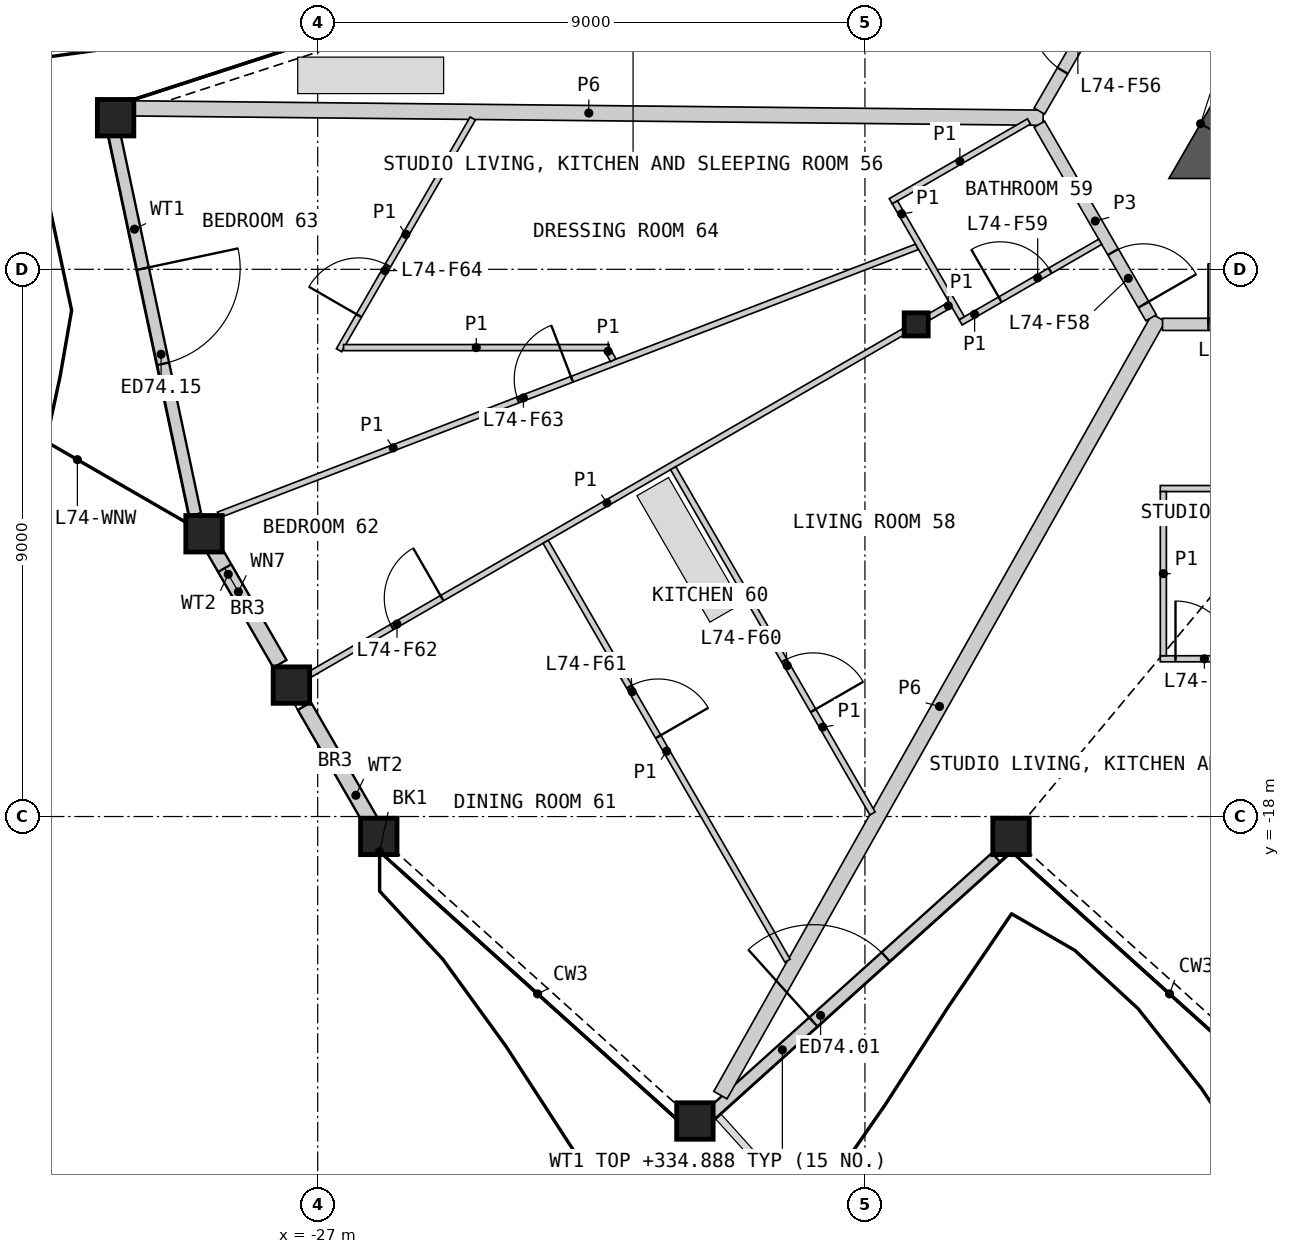
"""IFC4 building model, lengths in metres.
Left out: names, types, materials, properties, quantities, classifications, styles, units other than length and angle.
Written with IfcOpenShell. Run it as: python <this file> out.ifc"""

import sys

from ifc_helpers import new_model, si_unit, direction, frame, frame_2d, origin, origin_2d, place, context, subcontext, project, spatial, polyline, rectangle, hollow_rectangle, i_section, outline, extrude, element, fill, save


model = new_model("IFC4")
c1 = context("Model", 3, precision=1e-05, world=origin(), true_north=direction((0.0, 1.0)))
c2 = subcontext(c1, "Body", "Model", "MODEL_VIEW")
j1 = project(units=[si_unit("LENGTHUNIT", "METRE"), si_unit("PLANEANGLEUNIT", "RADIAN")], contexts=[c1])
p1 = place(None, origin())
s1 = spatial("IfcSite", under=j1, at=p1, CompositionType="ELEMENT")
p2 = place(p1, origin())
s2 = spatial("IfcBuilding", under=s1, at=p2, CompositionType="ELEMENT")
p3 = place(p2, frame((0.0, 0.0, 332.4)))
s3 = spatial("IfcBuildingStorey", under=s2, at=p3, CompositionType="ELEMENT", Elevation=332.4)
for number, where, z_axis, x_axis in (
    (1, (-25.995, -18.327, 0.0), (0.0, 0.0, 1.0), (1.0, 0.0, 0.0)),
    (2, (-20.796, -23.008, 0.0), (0.0, 0.0, 1.0), (1.0, 0.0, 0.0)),
    (3, (-15.597, -18.327, 0.0), (0.0, 0.0, 1.0), (1.0, 0.0, 0.0)),
    (4, (-30.324, -6.506, 0.0), (0.0, 0.0, 1.0), (1.0, 0.0, 0.0)),
    (5, (-28.869, -13.349, 0.0), (0.0, 0.0, 1.0), (1.0, 0.0, 0.0)),
    (6, (-27.432, -15.838, 0.0), (0.0, 0.0, 1.0), (1.0, 0.0, 0.0)),
):
    element("IfcColumn", number, at=place(p3, frame(where, z_axis=z_axis, x_axis=x_axis)), inside=s3, PredefinedType="COLUMN", context=c2, shape_type="SweptSolid", body=[
        extrude(hollow_rectangle(XDim=0.6, YDim=0.6, WallThickness=0.04, at=origin_2d()), origin(), (0.0, 0.0, 1.0), 3.4),
    ])
p4 = place(p3, frame((-17.157, -9.906, 0.0), z_axis=(0.0, 0.0, 1.0), x_axis=(1.0, 0.0, 0.0)))
e7 = element("IfcColumn", 7, at=p4, inside=s3, PredefinedType="COLUMN", context=c2, shape_type="SweptSolid", body=[
    extrude(i_section(OverallWidth=0.396, OverallDepth=0.381, WebThickness=0.019, FlangeThickness=0.03, at=origin_2d()), origin(), (0.0, 0.0, 1.0), 3.4),
])
p5 = place(p3, frame((-20.53, -22.892, 0.0), z_axis=(0.0, 0.0, 1.0), x_axis=(0.743134328827, 0.669142263887, 0.0)))
e8 = element("IfcWall", 8, at=p5, inside=s3, PredefinedType="SOLIDWALL", context=c2, shape_type="SweptSolid", body=[
    extrude(rectangle(XDim=6.305, YDim=0.2, at=frame_2d((3.153, 0.0))), origin(), (0.0, 0.0, 1.0), 2.488),
])
p6 = place(p5, frame((2.262, 0.0, 0.0)))
e9 = element("IfcOpeningElement", 9, at=p6, cuts=e8, PredefinedType="OPENING", context=c2, shape_type="SweptSolid", body=[
    extrude(rectangle(XDim=1.6, YDim=2.25, at=frame_2d((0.8, 1.125))), frame((0.0, 0.11, 0.0), z_axis=(0.0, -1.0, 0.0), x_axis=(1.0, 0.0, 0.0)), (0.0, 0.0, 1.0), 0.22),
])
p7 = place(p3, frame((-30.345, -6.776, 0.0), z_axis=(0.0, 0.0, 1.0), x_axis=(0.207897099812, -0.978150702034, 0.0)))
e10 = element("IfcWall", 10, at=p7, inside=s3, PredefinedType="SOLIDWALL", context=c2, shape_type="SweptSolid", body=[
    extrude(rectangle(XDim=6.396, YDim=0.2, at=frame_2d((3.198, 0.0))), origin(), (0.0, 0.0, 1.0), 2.488),
])
p8 = place(p7, frame((2.262, 0.0, 0.0)))
e11 = element("IfcOpeningElement", 11, at=p8, cuts=e10, PredefinedType="OPENING", context=c2, shape_type="SweptSolid", body=[
    extrude(rectangle(XDim=1.6, YDim=2.25, at=frame_2d((0.8, 1.125))), frame((0.0, 0.11, 0.0), z_axis=(0.0, -1.0, 0.0), x_axis=(1.0, 0.0, 0.0)), (0.0, 0.0, 1.0), 0.22),
])
p9 = place(p3, frame((-28.754, -13.525, 0.0), z_axis=(0.0, 0.0, 1.0), x_axis=(0.49996174997, -0.866047486323, 0.0)))
e12 = element("IfcWall", 12, at=p9, inside=s3, PredefinedType="SOLIDWALL", context=c2, shape_type="SweptSolid", body=[
    extrude(rectangle(XDim=2.267, YDim=0.25, at=frame_2d((1.133, 0.0))), origin(), (0.0, 0.0, 1.0), 2.488),
])
p10 = place(p9, frame((0.45, 0.0, 1.6)))
e13 = element("IfcOpeningElement", 13, at=p10, cuts=e12, PredefinedType="OPENING", context=c2, shape_type="SweptSolid", body=[
    extrude(rectangle(XDim=0.9, YDim=0.6, at=frame_2d((0.45, 0.3))), frame((0.0, 0.135, 0.0), z_axis=(0.0, -1.0, 0.0), x_axis=(1.0, 0.0, 0.0)), (0.0, 0.0, 1.0), 0.27),
])
p11 = place(p3, frame((-27.219, -16.184, 0.0), z_axis=(0.0, 0.0, 1.0), x_axis=(0.500046963369, -0.865998287773, 0.0)))
e14 = element("IfcWall", 14, at=p11, inside=s3, PredefinedType="SOLIDWALL", context=c2, shape_type="SweptSolid", body=[
    extrude(rectangle(XDim=2.258, YDim=0.25, at=frame_2d((1.129, 0.0))), origin(), (0.0, 0.0, 1.0), 2.488),
])
p12 = place(p3, frame((-9.562, -2.15, 0.0), z_axis=(0.0, 0.0, 1.0), x_axis=(-0.500015214976, -0.866016619236, 0.0)))
e15 = element("IfcWall", 15, at=p12, inside=s3, PredefinedType="SHEAR", context=c2, shape_type="SweptSolid", body=[
    extrude(rectangle(XDim=5.318, YDim=0.6, at=frame_2d((2.659, 0.0))), origin(), (0.0, 0.0, 1.0), 3.1),
])
p13 = place(p3, origin())
e16 = element("IfcWall", 16, at=p13, inside=s3, PredefinedType="SHEAR", context=c2, shape_type="SweptSolid", body=[
    extrude(outline(polyline([(-12.48, -6.606), (-11.961, -6.906), (-11.961, -7.506), (-13.0, -7.506), (-12.48, -6.606)])), origin(), (0.0, 0.0, 1.0), 3.1),
])
p14 = place(p3, frame((-30.014, -6.353, 0.0), z_axis=(0.0, 0.0, 1.0), x_axis=(0.999946875776, -0.010307551845, 0.0)))
e17 = element("IfcWall", 17, at=p14, inside=s3, PredefinedType="PARTITIONING", context=c2, shape_type="SweptSolid", body=[
    extrude(rectangle(XDim=14.946, YDim=0.25, at=frame_2d((7.473, 0.0))), origin(), (0.0, 0.0, 1.0), 2.33),
])
p15 = place(p3, frame((-20.376, -22.582, 0.0), z_axis=(0.0, 0.0, 1.0), x_axis=(0.491057132664, 0.871127368678, 0.0)))
e18 = element("IfcWall", 18, at=p15, inside=s3, PredefinedType="PARTITIONING", context=c2, shape_type="SweptSolid", body=[
    extrude(rectangle(XDim=14.677, YDim=0.25, at=frame_2d((7.338, 0.0))), origin(), (0.0, 0.0, 1.0), 2.33),
])
p16 = place(p3, frame((-13.106, -9.906, 0.0), z_axis=(0.0, 0.0, 1.0), x_axis=(1.0, 0.0, 0.0)))
e19 = element("IfcWall", 19, at=p16, inside=s3, PredefinedType="PARTITIONING", context=c2, shape_type="SweptSolid", body=[
    extrude(rectangle(XDim=4.32, YDim=0.2, at=frame_2d((2.16, 0.0))), origin(), (0.0, 0.0, 1.0), 3.1),
])
p17 = place(p16, frame((0.753, 0.0, 0.0)))
e20 = element("IfcOpeningElement", 20, at=p17, cuts=e19, PredefinedType="OPENING", context=c2, shape_type="SweptSolid", body=[
    extrude(rectangle(XDim=1.0, YDim=2.1, at=frame_2d((0.5, 1.05))), frame((0.0, 0.11, 0.0), z_axis=(0.0, -1.0, 0.0), x_axis=(1.0, 0.0, 0.0)), (0.0, 0.0, 1.0), 0.22),
])
p18 = place(p3, frame((-15.131, -6.397, 0.0), z_axis=(0.0, 0.0, 1.0), x_axis=(0.500003406062, 0.866023437285, 0.0)))
e21 = element("IfcWall", 21, at=p18, inside=s3, PredefinedType="PARTITIONING", context=c2, shape_type="SweptSolid", body=[
    extrude(rectangle(XDim=4.288, YDim=0.2, at=frame_2d((2.144, 0.0))), origin(), (0.0, 0.0, 1.0), 3.1),
])
p19 = place(p18, frame((0.766, 0.0, 0.0)))
e22 = element("IfcOpeningElement", 22, at=p19, cuts=e21, PredefinedType="OPENING", context=c2, shape_type="SweptSolid", body=[
    extrude(rectangle(XDim=1.0, YDim=2.1, at=frame_2d((0.5, 1.05))), frame((0.0, 0.11, 0.0), z_axis=(0.0, -1.0, 0.0), x_axis=(1.0, 0.0, 0.0)), (0.0, 0.0, 1.0), 0.22),
])
p20 = place(p3, frame((-15.131, -6.614, 0.0), z_axis=(0.0, 0.0, 1.0), x_axis=(0.499967746641, -0.866044024469, 0.0)))
e23 = element("IfcWall", 23, at=p20, inside=s3, PredefinedType="PARTITIONING", context=c2, shape_type="SweptSolid", body=[
    extrude(rectangle(XDim=3.676, YDim=0.2, at=frame_2d((1.838, 0.0))), origin(), (0.0, 0.0, 1.0), 3.1),
])
p21 = place(p20, frame((2.426, 0.0, 0.0)))
e24 = element("IfcOpeningElement", 24, at=p21, cuts=e23, PredefinedType="OPENING", context=c2, shape_type="SweptSolid", body=[
    extrude(rectangle(XDim=1.0, YDim=2.1, at=frame_2d((0.5, 1.05))), frame((0.0, 0.11, 0.0), z_axis=(0.0, -1.0, 0.0), x_axis=(1.0, 0.0, 0.0)), (0.0, 0.0, 1.0), 0.22),
])
p22 = place(p3, frame((-28.631, -13.039, 0.0), z_axis=(0.0, 0.0, 1.0), x_axis=(0.933581130309, 0.358366116048, 0.0)))
e25 = element("IfcWall", 25, at=p22, inside=s3, PredefinedType="PARTITIONING", context=c2, shape_type="SweptSolid", body=[
    extrude(rectangle(XDim=12.306, YDim=0.1, at=frame_2d((6.153, 0.0))), origin(), (0.0, 0.0, 1.0), 2.33),
])
p23 = place(p22, frame((5.276, 0.0, 0.0)))
e26 = element("IfcOpeningElement", 26, at=p23, cuts=e25, PredefinedType="OPENING", context=c2, shape_type="SweptSolid", body=[
    extrude(rectangle(XDim=0.95, YDim=2.1, at=frame_2d((0.475, 1.05))), frame((0.0, 0.06, 0.0), z_axis=(0.0, -1.0, 0.0), x_axis=(1.0, 0.0, 0.0)), (0.0, 0.0, 1.0), 0.12),
])
p24 = place(p3, frame((-27.122, -15.659, 0.0), z_axis=(0.0, 0.0, 1.0), x_axis=(0.866021046153, 0.500007547564, 0.0)))
e27 = element("IfcWall", 27, at=p24, inside=s3, PredefinedType="PARTITIONING", context=c2, shape_type="SweptSolid", body=[
    extrude(rectangle(XDim=11.267, YDim=0.1, at=frame_2d((5.634, 0.0))), origin(), (0.0, 0.0, 1.0), 2.33),
])
p25 = place(p24, frame((1.552, 0.0, 0.0)))
e28 = element("IfcOpeningElement", 28, at=p25, cuts=e27, PredefinedType="OPENING", context=c2, shape_type="SweptSolid", body=[
    extrude(rectangle(XDim=0.95, YDim=2.1, at=frame_2d((0.475, 1.05))), frame((0.0, 0.06, 0.0), z_axis=(0.0, -1.0, 0.0), x_axis=(1.0, 0.0, 0.0)), (0.0, 0.0, 1.0), 0.12),
])
p26 = place(p3, frame((-23.251, -13.482, 0.0), z_axis=(0.0, 0.0, 1.0), x_axis=(0.500017325895, -0.866015400443, 0.0)))
e29 = element("IfcWall", 29, at=p26, inside=s3, PredefinedType="PARTITIONING", context=c2, shape_type="SweptSolid", body=[
    extrude(rectangle(XDim=7.955, YDim=0.1, at=frame_2d((3.978, 0.0))), origin(), (0.0, 0.0, 1.0), 2.33),
])
p27 = place(p26, frame((2.752, 0.0, 0.0)))
e30 = element("IfcOpeningElement", 30, at=p27, cuts=e29, PredefinedType="OPENING", context=c2, shape_type="SweptSolid", body=[
    extrude(rectangle(XDim=0.95, YDim=2.1, at=frame_2d((0.475, 1.05))), frame((0.0, 0.06, 0.0), z_axis=(0.0, -1.0, 0.0), x_axis=(1.0, 0.0, 0.0)), (0.0, 0.0, 1.0), 0.12),
])
p28 = place(p3, frame((-21.154, -12.271, 0.0), z_axis=(0.0, 0.0, 1.0), x_axis=(0.500011451804, -0.866018791981, 0.0)))
e31 = element("IfcWall", 31, at=p28, inside=s3, PredefinedType="PARTITIONING", context=c2, shape_type="SweptSolid", body=[
    extrude(rectangle(XDim=6.557, YDim=0.1, at=frame_2d((3.278, 0.0))), origin(), (0.0, 0.0, 1.0), 2.33),
])
p29 = place(p28, frame((3.655, 0.0, 0.0)))
e32 = element("IfcOpeningElement", 32, at=p29, cuts=e31, PredefinedType="OPENING", context=c2, shape_type="SweptSolid", body=[
    extrude(rectangle(XDim=0.95, YDim=2.1, at=frame_2d((0.475, 1.05))), frame((0.0, 0.06, 0.0), z_axis=(0.0, -1.0, 0.0), x_axis=(1.0, 0.0, 0.0)), (0.0, 0.0, 1.0), 0.12),
])
p30 = place(p3, frame((-13.143, -12.606, 0.0), z_axis=(0.0, 0.0, 1.0), x_axis=(1.0, 0.0, 0.0)))
e33 = element("IfcWall", 33, at=p30, inside=s3, PredefinedType="PARTITIONING", context=c2, shape_type="SweptSolid", body=[
    extrude(rectangle(XDim=5.5, YDim=0.1, at=frame_2d((2.75, 0.0))), origin(), (0.0, 0.0, 1.0), 2.33),
])
p31 = place(p3, frame((-13.143, -15.406, 0.0), z_axis=(0.0, 0.0, 1.0), x_axis=(1.0, 0.0, 0.0)))
e34 = element("IfcWall", 34, at=p31, inside=s3, PredefinedType="PARTITIONING", context=c2, shape_type="SweptSolid", body=[
    extrude(rectangle(XDim=5.5, YDim=0.1, at=frame_2d((2.75, 0.0))), origin(), (0.0, 0.0, 1.0), 2.33),
])
p32 = place(p31, frame((0.25, 0.0, 0.0)))
e35 = element("IfcOpeningElement", 35, at=p32, cuts=e34, PredefinedType="OPENING", context=c2, shape_type="SweptSolid", body=[
    extrude(rectangle(XDim=0.95, YDim=2.1, at=frame_2d((0.475, 1.05))), frame((0.0, 0.06, 0.0), z_axis=(0.0, -1.0, 0.0), x_axis=(1.0, 0.0, 0.0)), (0.0, 0.0, 1.0), 0.12),
])
p33 = place(p31, frame((3.591, 0.0, 0.0)))
e36 = element("IfcOpeningElement", 36, at=p33, cuts=e34, PredefinedType="OPENING", context=c2, shape_type="SweptSolid", body=[
    extrude(rectangle(XDim=0.95, YDim=2.1, at=frame_2d((0.475, 1.05))), frame((0.0, 0.06, 0.0), z_axis=(0.0, -1.0, 0.0), x_axis=(1.0, 0.0, 0.0)), (0.0, 0.0, 1.0), 0.12),
])
p34 = place(p3, frame((-26.65, -10.331, 0.0), z_axis=(0.0, 0.0, 1.0), x_axis=(0.499992938033, 0.866029480975, 0.0)))
e37 = element("IfcWall", 37, at=p34, inside=s3, PredefinedType="PARTITIONING", context=c2, shape_type="SweptSolid", body=[
    extrude(rectangle(XDim=4.401, YDim=0.1, at=frame_2d((2.201, 0.0))), origin(), (0.0, 0.0, 1.0), 2.33),
])
p35 = place(p34, frame((0.657, 0.0, 0.0)))
e38 = element("IfcOpeningElement", 38, at=p35, cuts=e37, PredefinedType="OPENING", context=c2, shape_type="SweptSolid", body=[
    extrude(rectangle(XDim=0.95, YDim=2.1, at=frame_2d((0.475, 1.05))), frame((0.0, 0.06, 0.0), z_axis=(0.0, -1.0, 0.0), x_axis=(1.0, 0.0, 0.0)), (0.0, 0.0, 1.0), 0.12),
])
p36 = place(p3, frame((-26.575, -10.287, 0.0), z_axis=(0.0, 0.0, 1.0), x_axis=(1.0, 0.0, 0.0)))
e39 = element("IfcWall", 39, at=p36, inside=s3, PredefinedType="PARTITIONING", context=c2, shape_type="SweptSolid", body=[
    extrude(rectangle(XDim=4.367, YDim=0.1, at=frame_2d((2.184, 0.0))), origin(), (0.0, 0.0, 1.0), 2.33),
])
p37 = place(p3, frame((-13.093, -15.356, 0.0), z_axis=(0.0, 0.0, 1.0), x_axis=(0.0, 1.0, 0.0)))
e40 = element("IfcWall", 40, at=p37, inside=s3, PredefinedType="PARTITIONING", context=c2, shape_type="SweptSolid", body=[
    extrude(rectangle(XDim=2.7, YDim=0.1, at=frame_2d((1.35, 0.0))), origin(), (0.0, 0.0, 1.0), 2.33),
])
p38 = place(p3, frame((-16.426, -9.872, 0.0), z_axis=(0.0, 0.0, 1.0), x_axis=(0.866029095148, 0.499993606316, 0.0)))
e41 = element("IfcWall", 41, at=p38, inside=s3, PredefinedType="PARTITIONING", context=c2, shape_type="SweptSolid", body=[
    extrude(rectangle(XDim=2.65, YDim=0.1, at=frame_2d((1.325, 0.0))), origin(), (0.0, 0.0, 1.0), 2.33),
])
p39 = place(p38, frame((0.75, 0.0, 0.0)))
e42 = element("IfcOpeningElement", 42, at=p39, cuts=e41, PredefinedType="OPENING", context=c2, shape_type="SweptSolid", body=[
    extrude(rectangle(XDim=0.95, YDim=2.1, at=frame_2d((0.475, 1.05))), frame((0.0, 0.06, 0.0), z_axis=(0.0, -1.0, 0.0), x_axis=(1.0, 0.0, 0.0)), (0.0, 0.0, 1.0), 0.12),
])
p40 = place(p3, frame((-17.575, -7.881, 0.0), z_axis=(0.0, 0.0, 1.0), x_axis=(0.866036909293, 0.499980071345, 0.0)))
e43 = element("IfcWall", 43, at=p40, inside=s3, PredefinedType="PARTITIONING", context=c2, shape_type="SweptSolid", body=[
    extrude(rectangle(XDim=2.625, YDim=0.1, at=frame_2d((1.312, 0.0))), origin(), (0.0, 0.0, 1.0), 2.33),
])
p41 = place(p3, frame((-17.507, -7.899, 0.0), z_axis=(0.0, 0.0, 1.0), x_axis=(0.499946605688, -0.86605622881, 0.0)))
e44 = element("IfcWall", 44, at=p41, inside=s3, PredefinedType="PARTITIONING", context=c2, shape_type="SweptSolid", body=[
    extrude(rectangle(XDim=2.2, YDim=0.1, at=frame_2d((1.1, 0.0))), origin(), (0.0, 0.0, 1.0), 2.33),
])
p42 = place(p3, frame((-16.949, -9.786, 0.0), z_axis=(0.0, 0.0, 1.0), x_axis=(0.866036909293, 0.499980071345, 0.0)))
e45 = element("IfcWall", 45, at=p42, inside=s3, PredefinedType="PARTITIONING", context=c2, shape_type="SweptSolid", body=[
    extrude(rectangle(XDim=0.41, YDim=0.1, at=frame_2d((0.205, 0.0))), origin(), (0.0, 0.0, 1.0), 2.33),
])
p43 = place(p3, frame((-22.233, -10.331, 0.0), z_axis=(0.0, 0.0, 1.0), x_axis=(0.500169931485, -0.865927271564, 0.0)))
e46 = element("IfcWall", 46, at=p43, inside=s3, PredefinedType="PARTITIONING", context=c2, shape_type="SweptSolid", body=[
    extrude(rectangle(XDim=0.189, YDim=0.1, at=frame_2d((0.094, 0.0))), origin(), (0.0, 0.0, 1.0), 2.33),
])
p44 = place(p6, origin())
e47 = element("IfcDoor", 47, at=p44, inside=s3, OperationType="DOUBLE_DOOR_SINGLE_SWING", PredefinedType="DOOR", context=c2, shape_type="SweptSolid", body=[
    extrude(rectangle(XDim=1.6, YDim=2.25, at=frame_2d((0.8, 1.125))), frame((0.0, 0.025, 0.0), z_axis=(0.0, -1.0, 0.0), x_axis=(1.0, 0.0, 0.0)), (0.0, 0.0, 1.0), 0.05),
])
fill(e9, e47)
p45 = place(p8, origin())
e48 = element("IfcDoor", 48, at=p45, inside=s3, OperationType="DOUBLE_DOOR_SINGLE_SWING", PredefinedType="DOOR", context=c2, shape_type="SweptSolid", body=[
    extrude(rectangle(XDim=1.6, YDim=2.25, at=frame_2d((0.8, 1.125))), frame((0.0, 0.025, 0.0), z_axis=(0.0, -1.0, 0.0), x_axis=(1.0, 0.0, 0.0)), (0.0, 0.0, 1.0), 0.05),
])
fill(e11, e48)
p46 = place(p10, origin())
e49 = element("IfcWindow", 49, at=p46, inside=s3, PartitioningType="SINGLE_PANEL", PredefinedType="WINDOW", context=c2, shape_type="SweptSolid", body=[
    extrude(rectangle(XDim=0.9, YDim=0.6, at=frame_2d((0.45, 0.3))), frame((0.0, 0.03, 0.0), z_axis=(0.0, -1.0, 0.0), x_axis=(1.0, 0.0, 0.0)), (0.0, 0.0, 1.0), 0.06),
])
fill(e13, e49)
p47 = place(p17, origin())
e50 = element("IfcDoor", 50, at=p47, inside=s3, OperationType="SINGLE_SWING_LEFT", PredefinedType="DOOR", context=c2, shape_type="SweptSolid", body=[
    extrude(rectangle(XDim=1.0, YDim=2.1, at=frame_2d((0.5, 1.05))), frame((0.0, 0.025, 0.0), z_axis=(0.0, -1.0, 0.0), x_axis=(1.0, 0.0, 0.0)), (0.0, 0.0, 1.0), 0.05),
])
fill(e20, e50)
p48 = place(p32, origin())
e51 = element("IfcDoor", 51, at=p48, inside=s3, OperationType="SINGLE_SWING_LEFT", PredefinedType="DOOR", context=c2, shape_type="SweptSolid", body=[
    extrude(rectangle(XDim=0.95, YDim=2.1, at=frame_2d((0.475, 1.05))), frame((0.0, 0.025, 0.0), z_axis=(0.0, -1.0, 0.0), x_axis=(1.0, 0.0, 0.0)), (0.0, 0.0, 1.0), 0.05),
])
fill(e35, e51)
p49 = place(p19, origin())
e52 = element("IfcDoor", 52, at=p49, inside=s3, OperationType="SINGLE_SWING_RIGHT", PredefinedType="DOOR", context=c2, shape_type="SweptSolid", body=[
    extrude(rectangle(XDim=1.0, YDim=2.1, at=frame_2d((0.5, 1.05))), frame((0.0, 0.025, 0.0), z_axis=(0.0, -1.0, 0.0), x_axis=(1.0, 0.0, 0.0)), (0.0, 0.0, 1.0), 0.05),
])
fill(e22, e52)
p50 = place(p21, origin())
e53 = element("IfcDoor", 53, at=p50, inside=s3, OperationType="SINGLE_SWING_RIGHT", PredefinedType="DOOR", context=c2, shape_type="SweptSolid", body=[
    extrude(rectangle(XDim=1.0, YDim=2.1, at=frame_2d((0.5, 1.05))), frame((0.0, 0.025, 0.0), z_axis=(0.0, -1.0, 0.0), x_axis=(1.0, 0.0, 0.0)), (0.0, 0.0, 1.0), 0.05),
])
fill(e24, e53)
p51 = place(p39, origin())
e54 = element("IfcDoor", 54, at=p51, inside=s3, OperationType="SINGLE_SWING_LEFT", PredefinedType="DOOR", context=c2, shape_type="SweptSolid", body=[
    extrude(rectangle(XDim=0.95, YDim=2.1, at=frame_2d((0.475, 1.05))), frame((0.0, 0.025, 0.0), z_axis=(0.0, -1.0, 0.0), x_axis=(1.0, 0.0, 0.0)), (0.0, 0.0, 1.0), 0.05),
])
fill(e42, e54)
p52 = place(p29, origin())
e55 = element("IfcDoor", 55, at=p52, inside=s3, OperationType="SINGLE_SWING_RIGHT", PredefinedType="DOOR", context=c2, shape_type="SweptSolid", body=[
    extrude(rectangle(XDim=0.95, YDim=2.1, at=frame_2d((0.475, 1.05))), frame((0.0, 0.025, 0.0), z_axis=(0.0, -1.0, 0.0), x_axis=(1.0, 0.0, 0.0)), (0.0, 0.0, 1.0), 0.05),
])
fill(e32, e55)
p53 = place(p27, origin())
e56 = element("IfcDoor", 56, at=p53, inside=s3, OperationType="SINGLE_SWING_RIGHT", PredefinedType="DOOR", context=c2, shape_type="SweptSolid", body=[
    extrude(rectangle(XDim=0.95, YDim=2.1, at=frame_2d((0.475, 1.05))), frame((0.0, 0.025, 0.0), z_axis=(0.0, -1.0, 0.0), x_axis=(1.0, 0.0, 0.0)), (0.0, 0.0, 1.0), 0.05),
])
fill(e30, e56)
p54 = place(p25, origin())
e57 = element("IfcDoor", 57, at=p54, inside=s3, OperationType="SINGLE_SWING_RIGHT", PredefinedType="DOOR", context=c2, shape_type="SweptSolid", body=[
    extrude(rectangle(XDim=0.95, YDim=2.1, at=frame_2d((0.475, 1.05))), frame((0.0, 0.025, 0.0), z_axis=(0.0, -1.0, 0.0), x_axis=(1.0, 0.0, 0.0)), (0.0, 0.0, 1.0), 0.05),
])
fill(e28, e57)
p55 = place(p23, origin())
e58 = element("IfcDoor", 58, at=p55, inside=s3, OperationType="SINGLE_SWING_RIGHT", PredefinedType="DOOR", context=c2, shape_type="SweptSolid", body=[
    extrude(rectangle(XDim=0.95, YDim=2.1, at=frame_2d((0.475, 1.05))), frame((0.0, 0.025, 0.0), z_axis=(0.0, -1.0, 0.0), x_axis=(1.0, 0.0, 0.0)), (0.0, 0.0, 1.0), 0.05),
])
fill(e26, e58)
p56 = place(p35, origin())
e59 = element("IfcDoor", 59, at=p56, inside=s3, OperationType="SINGLE_SWING_LEFT", PredefinedType="DOOR", context=c2, shape_type="SweptSolid", body=[
    extrude(rectangle(XDim=0.95, YDim=2.1, at=frame_2d((0.475, 1.05))), frame((0.0, 0.025, 0.0), z_axis=(0.0, -1.0, 0.0), x_axis=(1.0, 0.0, 0.0)), (0.0, 0.0, 1.0), 0.05),
])
fill(e38, e59)
save(model, sys.argv[1])
